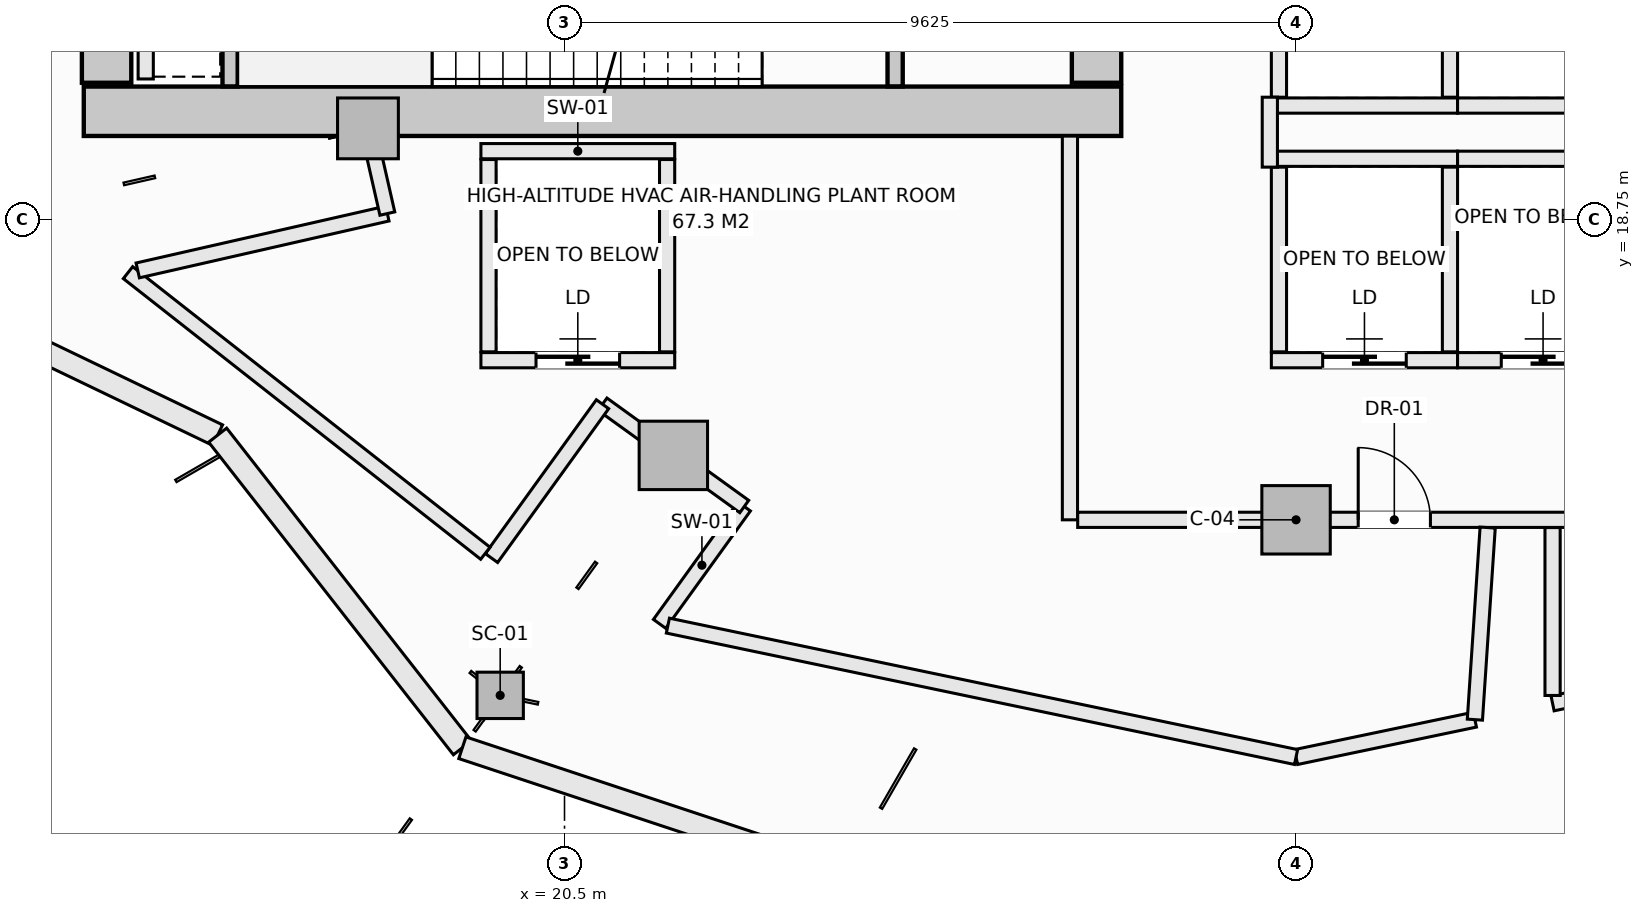
"""IFC4 building model, lengths in metres.
Left out: names, types, materials, properties, quantities, classifications, styles, units other than length and angle.
Written with IfcOpenShell. Run it as: python <this file> out.ifc"""

import sys

from ifc_helpers import new_model, si_unit, direction, frame, frame_2d, origin, origin_2d, place, context, subcontext, project, spatial, rectangle, hollow_rectangle, extrude, element, fill, save


model = new_model("IFC4")
c1 = context("Model", 3, precision=1e-05, world=origin(), true_north=direction((0.0, 1.0)))
c2 = subcontext(c1, "Body", "Model", "MODEL_VIEW")
j1 = project(units=[si_unit("LENGTHUNIT", "METRE"), si_unit("PLANEANGLEUNIT", "RADIAN")], contexts=[c1])
p1 = place(None, origin())
s1 = spatial("IfcSite", under=j1, at=p1, CompositionType="ELEMENT")
p2 = place(p1, origin())
s2 = spatial("IfcBuilding", under=s1, at=p2, CompositionType="ELEMENT")
p3 = place(p2, frame((0.0, 0.0, 186.9)))
s3 = spatial("IfcBuildingStorey", under=s2, at=p3, CompositionType="ELEMENT", Elevation=186.9)
p4 = place(p3, frame((14.175, 20.175, -0.32), z_axis=(0.0, 0.0, 1.0), x_axis=(1.0, 0.0, 0.0)))
e1 = element("IfcWall", 1, at=p4, inside=s3, PredefinedType="SHEAR", context=c2, shape_type="SweptSolid", body=[
    extrude(rectangle(XDim=13.65, YDim=0.65, at=frame_2d((6.825, 0.0))), origin(), (0.0, 0.0, 1.0), 5.04),
])
p5 = place(p3, frame((14.475, 20.55, -0.32), z_axis=(0.0, 0.0, 1.0), x_axis=(0.0, 1.0, 0.0)))
e2 = element("IfcWall", 2, at=p5, inside=s3, PredefinedType="SHEAR", context=c2, shape_type="SweptSolid", body=[
    extrude(rectangle(XDim=12.9, YDim=0.65, at=frame_2d((6.45, 0.0))), origin(), (0.0, 0.0, 1.0), 5.04),
])
p6 = place(p3, frame((27.5, 20.55, -0.32), z_axis=(0.0, 0.0, 1.0), x_axis=(0.0, 1.0, 0.0)))
e3 = element("IfcWall", 3, at=p6, inside=s3, PredefinedType="SHEAR", context=c2, shape_type="SweptSolid", body=[
    extrude(rectangle(XDim=1.5, YDim=0.65, at=frame_2d((0.75, 0.0))), origin(), (0.0, 0.0, 1.0), 5.04),
])
p7 = place(p3, frame((19.654, 12.49, -0.32), z_axis=(0.0, 0.0, 1.0), x_axis=(1.0, 0.0, 0.0)))
e4 = element("IfcColumn", 4, at=p7, inside=s3, PredefinedType="COLUMN", context=c2, shape_type="SweptSolid", body=[
    extrude(hollow_rectangle(XDim=0.61, YDim=0.61, WallThickness=0.025, at=origin_2d()), origin(), (0.0, 0.0, 1.0), 5.04),
])
for number, where, z_axis, x_axis in (
    (5, (21.932, 15.648, -0.32), (0.0, 0.0, 1.0), (1.0, 0.0, 0.0)),
    (6, (30.125, 14.8, -0.32), (0.0, 0.0, 1.0), (1.0, 0.0, 0.0)),
):
    element("IfcColumn", number, at=place(p3, frame(where, z_axis=z_axis, x_axis=x_axis)), inside=s3, PredefinedType="COLUMN", context=c2, shape_type="SweptSolid", body=[
        extrude(rectangle(XDim=0.9, YDim=0.9, at=origin_2d()), origin(), (0.0, 0.0, 1.0), 5.04),
    ])
p8 = place(p3, frame((17.914, 19.95, -0.32), z_axis=(0.0, 0.0, 1.0), x_axis=(1.0, 0.0, 0.0)))
e7 = element("IfcColumn", 7, at=p8, inside=s3, PredefinedType="PILASTER", context=c2, shape_type="SweptSolid", body=[
    extrude(rectangle(XDim=0.8, YDim=0.8, at=origin_2d()), origin(), (0.0, 0.0, 1.0), 5.04),
])
p9 = place(p3, frame((11.127, 18.225, 0.0), z_axis=(0.0, 0.0, 1.0), x_axis=(0.901353070301, -0.433085029363, 0.0)))
e8 = element("IfcWall", 8, at=p9, inside=s3, PredefinedType="SOLIDWALL", context=c2, shape_type="SweptSolid", body=[
    extrude(rectangle(XDim=5.336, YDim=0.3, at=frame_2d((2.668, 0.0))), origin(), (0.0, 0.0, 1.0), 1.15),
])
p10 = place(p3, frame((15.937, 15.914, 0.0), z_axis=(0.0, 0.0, 1.0), x_axis=(0.616429245738, -0.787410302828, 0.0)))
e9 = element("IfcWall", 9, at=p10, inside=s3, PredefinedType="SOLIDWALL", context=c2, shape_type="SweptSolid", body=[
    extrude(rectangle(XDim=5.223, YDim=0.3, at=frame_2d((2.612, 0.0))), origin(), (0.0, 0.0, 1.0), 1.15),
])
p11 = place(p3, frame((19.156, 11.801, 0.0), z_axis=(0.0, 0.0, 1.0), x_axis=(0.949246811547, -0.314532177636, 0.0)))
e10 = element("IfcWall", 10, at=p11, inside=s3, PredefinedType="SOLIDWALL", context=c2, shape_type="SweptSolid", body=[
    extrude(rectangle(XDim=5.574, YDim=0.3, at=frame_2d((2.787, 0.0))), origin(), (0.0, 0.0, 1.0), 1.15),
])
p12 = place(p3, frame((24.85, 20.502, -0.32), z_axis=(0.0, 0.0, 1.0), x_axis=(0.0, 1.0, 0.0)))
e11 = element("IfcWall", 11, at=p12, inside=s3, PredefinedType="SHEAR", context=c2, shape_type="SweptSolid", body=[
    extrude(rectangle(XDim=3.038, YDim=0.2, at=frame_2d((1.519, 0.0))), origin(), (0.0, 0.0, 1.0), 5.04),
])
p13 = place(p12, frame((0.969, 0.0, 0.32)))
e12 = element("IfcOpeningElement", 12, at=p13, cuts=e11, PredefinedType="OPENING", context=c2, shape_type="SweptSolid", body=[
    extrude(rectangle(XDim=1.1, YDim=2.15, at=frame_2d((0.55, 1.075))), frame((0.0, 0.11, 0.0), z_axis=(0.0, -1.0, 0.0), x_axis=(1.0, 0.0, 0.0)), (0.0, 0.0, 1.0), 0.22),
])
p14 = place(p3, frame((16.1, 20.502, -0.32), z_axis=(0.0, 0.0, 1.0), x_axis=(0.0, 1.0, 0.0)))
e13 = element("IfcWall", 13, at=p14, inside=s3, PredefinedType="SHEAR", context=c2, shape_type="SweptSolid", body=[
    extrude(rectangle(XDim=3.036, YDim=0.2, at=frame_2d((1.518, 0.0))), origin(), (0.0, 0.0, 1.0), 5.04),
])
p15 = place(p3, frame((19.4, 19.65, 0.0), z_axis=(0.0, 0.0, 1.0), x_axis=(1.0, 0.0, 0.0)))
e14 = element("IfcWall", 14, at=p15, inside=s3, PredefinedType="SOLIDWALL", context=c2, shape_type="SweptSolid", body=[
    extrude(rectangle(XDim=2.55, YDim=0.2, at=frame_2d((1.275, 0.0))), origin(), (0.0, 0.0, 1.0), 4.72),
])
p16 = place(p3, frame((19.4, 16.9, 0.0), z_axis=(0.0, 0.0, 1.0), x_axis=(1.0, 0.0, 0.0)))
e15 = element("IfcWall", 15, at=p16, inside=s3, PredefinedType="SOLIDWALL", context=c2, shape_type="SweptSolid", body=[
    extrude(rectangle(XDim=2.55, YDim=0.2, at=frame_2d((1.275, 0.0))), origin(), (0.0, 0.0, 1.0), 4.72),
])
p17 = place(p16, frame((0.725, 0.0, 0.0)))
e16 = element("IfcOpeningElement", 16, at=p17, cuts=e15, PredefinedType="OPENING", context=c2, shape_type="SweptSolid", body=[
    extrude(rectangle(XDim=1.1, YDim=2.2, at=frame_2d((0.55, 1.1))), frame((0.0, 0.11, 0.0), z_axis=(0.0, -1.0, 0.0), x_axis=(1.0, 0.0, 0.0)), (0.0, 0.0, 1.0), 0.22),
])
for number, where, z_axis, x_axis in (
    (17, (19.5, 17.01, 0.0), (0.0, 0.0, 1.0), (0.0, 1.0, 0.0)),
    (18, (21.85, 17.01, 0.0), (0.0, 0.0, 1.0), (0.0, 1.0, 0.0)),
):
    element("IfcWall", number, at=place(p3, frame(where, z_axis=z_axis, x_axis=x_axis)), inside=s3, PredefinedType="SOLIDWALL", context=c2, shape_type="SweptSolid", body=[
        extrude(rectangle(XDim=2.53, YDim=0.2, at=frame_2d((1.265, 0.0))), origin(), (0.0, 0.0, 1.0), 4.72),
    ])
p18 = place(p3, frame((29.8, 19.55, 0.0), z_axis=(0.0, 0.0, 1.0), x_axis=(1.0, 0.0, 0.0)))
e19 = element("IfcWall", 19, at=p18, inside=s3, PredefinedType="SOLIDWALL", context=c2, shape_type="SweptSolid", body=[
    extrude(rectangle(XDim=2.45, YDim=0.2, at=frame_2d((1.225, 0.0))), origin(), (0.0, 0.0, 1.0), 4.72),
])
p19 = place(p3, frame((29.8, 16.9, 0.0), z_axis=(0.0, 0.0, 1.0), x_axis=(1.0, 0.0, 0.0)))
e20 = element("IfcWall", 20, at=p19, inside=s3, PredefinedType="SOLIDWALL", context=c2, shape_type="SweptSolid", body=[
    extrude(rectangle(XDim=2.45, YDim=0.2, at=frame_2d((1.225, 0.0))), origin(), (0.0, 0.0, 1.0), 4.72),
])
p20 = place(p19, frame((0.675, 0.0, 0.0)))
e21 = element("IfcOpeningElement", 21, at=p20, cuts=e20, PredefinedType="OPENING", context=c2, shape_type="SweptSolid", body=[
    extrude(rectangle(XDim=1.1, YDim=2.2, at=frame_2d((0.55, 1.1))), frame((0.0, 0.11, 0.0), z_axis=(0.0, -1.0, 0.0), x_axis=(1.0, 0.0, 0.0)), (0.0, 0.0, 1.0), 0.22),
])
for number, where, z_axis, x_axis in (
    (22, (29.9, 17.01, 0.0), (0.0, 0.0, 1.0), (0.0, 1.0, 0.0)),
    (23, (32.15, 17.01, 0.0), (0.0, 0.0, 1.0), (0.0, 1.0, 0.0)),
):
    element("IfcWall", number, at=place(p3, frame(where, z_axis=z_axis, x_axis=x_axis)), inside=s3, PredefinedType="SOLIDWALL", context=c2, shape_type="SweptSolid", body=[
        extrude(rectangle(XDim=2.43, YDim=0.2, at=frame_2d((1.215, 0.0))), origin(), (0.0, 0.0, 1.0), 4.72),
    ])
p21 = place(p3, frame((32.25, 19.55, 0.0), z_axis=(0.0, 0.0, 1.0), x_axis=(1.0, 0.0, 0.0)))
e24 = element("IfcWall", 24, at=p21, inside=s3, PredefinedType="SOLIDWALL", context=c2, shape_type="SweptSolid", body=[
    extrude(rectangle(XDim=2.25, YDim=0.2, at=frame_2d((1.125, 0.0))), origin(), (0.0, 0.0, 1.0), 4.72),
])
p22 = place(p3, frame((32.25, 16.9, 0.0), z_axis=(0.0, 0.0, 1.0), x_axis=(1.0, 0.0, 0.0)))
e25 = element("IfcWall", 25, at=p22, inside=s3, PredefinedType="SOLIDWALL", context=c2, shape_type="SweptSolid", body=[
    extrude(rectangle(XDim=2.25, YDim=0.2, at=frame_2d((1.125, 0.0))), origin(), (0.0, 0.0, 1.0), 4.72),
])
p23 = place(p22, frame((0.575, 0.0, 0.0)))
e26 = element("IfcOpeningElement", 26, at=p23, cuts=e25, PredefinedType="OPENING", context=c2, shape_type="SweptSolid", body=[
    extrude(rectangle(XDim=1.1, YDim=2.2, at=frame_2d((0.55, 1.1))), frame((0.0, 0.11, 0.0), z_axis=(0.0, -1.0, 0.0), x_axis=(1.0, 0.0, 0.0)), (0.0, 0.0, 1.0), 0.22),
])
p24 = place(p3, frame((29.8, 20.25, 0.0), z_axis=(0.0, 0.0, 1.0), x_axis=(1.0, 0.0, 0.0)))
e27 = element("IfcWall", 27, at=p24, inside=s3, PredefinedType="SOLIDWALL", context=c2, shape_type="SweptSolid", body=[
    extrude(rectangle(XDim=2.45, YDim=0.2, at=frame_2d((1.225, 0.0))), origin(), (0.0, 0.0, 1.0), 4.72),
])
for number, where, z_axis, x_axis in (
    (28, (29.9, 20.36, 0.0), (0.0, 0.0, 1.0), (0.0, 1.0, 0.0)),
    (29, (32.15, 20.36, 0.0), (0.0, 0.0, 1.0), (0.0, 1.0, 0.0)),
):
    element("IfcWall", number, at=place(p3, frame(where, z_axis=z_axis, x_axis=x_axis)), inside=s3, PredefinedType="SOLIDWALL", context=c2, shape_type="SweptSolid", body=[
        extrude(rectangle(XDim=2.43, YDim=0.2, at=frame_2d((1.215, 0.0))), origin(), (0.0, 0.0, 1.0), 4.72),
    ])
p25 = place(p3, frame((32.25, 20.25, 0.0), z_axis=(0.0, 0.0, 1.0), x_axis=(1.0, 0.0, 0.0)))
e30 = element("IfcWall", 30, at=p25, inside=s3, PredefinedType="SOLIDWALL", context=c2, shape_type="SweptSolid", body=[
    extrude(rectangle(XDim=2.25, YDim=0.2, at=frame_2d((1.125, 0.0))), origin(), (0.0, 0.0, 1.0), 4.72),
])
p26 = place(p3, frame((14.99, 20.6, 0.0), z_axis=(0.0, 0.0, 1.0), x_axis=(0.0, 1.0, 0.0)))
e31 = element("IfcWall", 31, at=p26, inside=s3, PredefinedType="SOLIDWALL", context=c2, shape_type="SweptSolid", body=[
    extrude(rectangle(XDim=2.85, YDim=0.2, at=frame_2d((1.425, 0.0))), origin(), (0.0, 0.0, 1.0), 4.72),
])
p27 = place(p3, frame((27.15, 14.8, 0.0), z_axis=(0.0, 0.0, 1.0), x_axis=(0.0, 1.0, 0.0)))
e32 = element("IfcWall", 32, at=p27, inside=s3, PredefinedType="SOLIDWALL", context=c2, shape_type="SweptSolid", body=[
    extrude(rectangle(XDim=5.048, YDim=0.2, at=frame_2d((2.524, 0.0))), origin(), (0.0, 0.0, 1.0), 4.72),
])
p28 = place(p3, frame((29.78, 19.44, 0.0), z_axis=(0.0, 0.0, 1.0), x_axis=(0.0, 1.0, 0.0)))
e33 = element("IfcWall", 33, at=p28, inside=s3, PredefinedType="SOLIDWALL", context=c2, shape_type="SweptSolid", body=[
    extrude(rectangle(XDim=0.92, YDim=0.2, at=frame_2d((0.46, 0.0))), origin(), (0.0, 0.0, 1.0), 4.72),
])
p29 = place(p3, frame((27.252, 14.8, 0.0), z_axis=(0.0, 0.0, 1.0), x_axis=(1.0, 0.0, 0.0)))
e34 = element("IfcWall", 34, at=p29, inside=s3, PredefinedType="SOLIDWALL", context=c2, shape_type="SweptSolid", body=[
    extrude(rectangle(XDim=11.666, YDim=0.2, at=frame_2d((5.833, 0.0))), origin(), (0.0, 0.0, 1.0), 4.095),
])
p30 = place(p29, frame((3.691, 0.0, 0.0)))
e35 = element("IfcOpeningElement", 35, at=p30, cuts=e34, PredefinedType="OPENING", context=c2, shape_type="SweptSolid", body=[
    extrude(rectangle(XDim=0.95, YDim=2.1, at=frame_2d((0.475, 1.05))), frame((0.0, 0.11, 0.0), z_axis=(0.0, -1.0, 0.0), x_axis=(1.0, 0.0, 0.0)), (0.0, 0.0, 1.0), 0.22),
])
p31 = place(p3, frame((30.125, 11.679, 0.0), z_axis=(0.0, 0.0, 1.0), x_axis=(0.978816191304, 0.204740967179, 0.0)))
e36 = element("IfcWall", 36, at=p31, inside=s3, PredefinedType="SOLIDWALL", context=c2, shape_type="SweptSolid", body=[
    extrude(rectangle(XDim=2.404, YDim=0.2, at=frame_2d((1.202, 0.0))), origin(), (0.0, 0.0, 1.0), 4.72),
])
p32 = place(p3, frame((33.5, 12.385, 0.0), z_axis=(0.0, 0.0, 1.0), x_axis=(0.978811842639, 0.204761755974, 0.0)))
e37 = element("IfcWall", 37, at=p32, inside=s3, PredefinedType="SOLIDWALL", context=c2, shape_type="SweptSolid", body=[
    extrude(rectangle(XDim=6.652, YDim=0.2, at=frame_2d((3.326, 0.0))), origin(), (0.0, 0.0, 1.0), 4.72),
])
p33 = place(p3, frame((33.5, 12.489, 0.0), z_axis=(0.0, 0.0, 1.0), x_axis=(0.0, 1.0, 0.0)))
e38 = element("IfcWall", 38, at=p33, inside=s3, PredefinedType="SOLIDWALL", context=c2, shape_type="SweptSolid", body=[
    extrude(rectangle(XDim=2.209, YDim=0.2, at=frame_2d((1.104, 0.0))), origin(), (0.0, 0.0, 1.0), 4.72),
])
p34 = place(p3, frame((21.751, 13.431, 0.0), z_axis=(0.0, 0.0, 1.0), x_axis=(0.585064462576, 0.810986790663, 0.0)))
e39 = element("IfcWall", 39, at=p34, inside=s3, PredefinedType="SOLIDWALL", context=c2, shape_type="SweptSolid", body=[
    extrude(rectangle(XDim=1.904, YDim=0.2, at=frame_2d((0.952, 0.0))), origin(), (0.0, 0.0, 1.0), 4.72),
])
p35 = place(p3, frame((21.0, 16.321, 0.0), z_axis=(0.0, 0.0, 1.0), x_axis=(0.81088351332, -0.585207593786, 0.0)))
e40 = element("IfcWall", 40, at=p35, inside=s3, PredefinedType="SOLIDWALL", context=c2, shape_type="SweptSolid", body=[
    extrude(rectangle(XDim=2.3, YDim=0.2, at=frame_2d((1.15, 0.0))), origin(), (0.0, 0.0, 1.0), 4.095),
])
p36 = place(p3, frame((19.539, 14.297, 0.0), z_axis=(0.0, 0.0, 1.0), x_axis=(0.585283411791, 0.810828790733, 0.0)))
e41 = element("IfcWall", 41, at=p36, inside=s3, PredefinedType="SOLIDWALL", context=c2, shape_type="SweptSolid", body=[
    extrude(rectangle(XDim=2.496, YDim=0.2, at=frame_2d((1.248, 0.0))), origin(), (0.0, 0.0, 1.0), 4.72),
])
p37 = place(p3, frame((14.757, 18.052, 0.0), z_axis=(0.0, 0.0, 1.0), x_axis=(0.786502536139, -0.617587047019, 0.0)))
e42 = element("IfcWall", 42, at=p37, inside=s3, PredefinedType="SOLIDWALL", context=c2, shape_type="SweptSolid", body=[
    extrude(rectangle(XDim=5.978, YDim=0.2, at=frame_2d((2.989, 0.0))), origin(), (0.0, 0.0, 1.0), 4.72),
])
p38 = place(p3, frame((14.885, 18.081, 0.0), z_axis=(0.0, 0.0, 1.0), x_axis=(0.975039488854, 0.222031518427, 0.0)))
e43 = element("IfcWall", 43, at=p38, inside=s3, PredefinedType="SOLIDWALL", context=c2, shape_type="SweptSolid", body=[
    extrude(rectangle(XDim=3.368, YDim=0.2, at=frame_2d((1.684, 0.0))), origin(), (0.0, 0.0, 1.0), 4.72),
])
p39 = place(p3, frame((17.937, 19.848, 0.0), z_axis=(0.0, 0.0, 1.0), x_axis=(0.221752397237, -0.97510300703, 0.0)))
e44 = element("IfcWall", 44, at=p39, inside=s3, PredefinedType="SOLIDWALL", context=c2, shape_type="SweptSolid", body=[
    extrude(rectangle(XDim=1.045, YDim=0.2, at=frame_2d((0.522, 0.0))), origin(), (0.0, 0.0, 1.0), 4.095),
])
p40 = place(p3, frame((32.478, 12.171, 0.0), z_axis=(0.0, 0.0, 1.0), x_axis=(0.066423031806, 0.997791551801, 0.0)))
e45 = element("IfcWall", 45, at=p40, inside=s3, PredefinedType="SOLIDWALL", context=c2, shape_type="SweptSolid", body=[
    extrude(rectangle(XDim=2.532, YDim=0.2, at=frame_2d((1.266, 0.0))), origin(), (0.0, 0.0, 1.0), 4.72),
])
p41 = place(p3, frame((21.86, 13.408, 0.0), z_axis=(0.0, 0.0, 1.0), x_axis=(0.978803971654, -0.204799377621, 0.0)))
e46 = element("IfcWall", 46, at=p41, inside=s3, PredefinedType="SOLIDWALL", context=c2, shape_type="SweptSolid", body=[
    extrude(rectangle(XDim=8.444, YDim=0.2, at=frame_2d((4.222, 0.0))), origin(), (0.0, 0.0, 1.0), 4.72),
])
p42 = place(p17, origin())
e47 = element("IfcDoor", 47, at=p42, inside=s3, OperationType="SLIDING_TO_LEFT", PredefinedType="DOOR", context=c2, shape_type="SweptSolid", body=[
    extrude(rectangle(XDim=1.1, YDim=2.2, at=frame_2d((0.55, 1.1))), frame((0.0, 0.025, 0.0), z_axis=(0.0, -1.0, 0.0), x_axis=(1.0, 0.0, 0.0)), (0.0, 0.0, 1.0), 0.05),
])
fill(e16, e47)
p43 = place(p20, origin())
e48 = element("IfcDoor", 48, at=p43, inside=s3, OperationType="SLIDING_TO_LEFT", PredefinedType="DOOR", context=c2, shape_type="SweptSolid", body=[
    extrude(rectangle(XDim=1.1, YDim=2.2, at=frame_2d((0.55, 1.1))), frame((0.0, 0.025, 0.0), z_axis=(0.0, -1.0, 0.0), x_axis=(1.0, 0.0, 0.0)), (0.0, 0.0, 1.0), 0.05),
])
fill(e21, e48)
p44 = place(p23, origin())
e49 = element("IfcDoor", 49, at=p44, inside=s3, OperationType="SLIDING_TO_LEFT", PredefinedType="DOOR", context=c2, shape_type="SweptSolid", body=[
    extrude(rectangle(XDim=1.1, YDim=2.2, at=frame_2d((0.55, 1.1))), frame((0.0, 0.025, 0.0), z_axis=(0.0, -1.0, 0.0), x_axis=(1.0, 0.0, 0.0)), (0.0, 0.0, 1.0), 0.05),
])
fill(e26, e49)
p45 = place(p30, origin())
e50 = element("IfcDoor", 50, at=p45, inside=s3, OperationType="SINGLE_SWING_LEFT", PredefinedType="DOOR", context=c2, shape_type="SweptSolid", body=[
    extrude(rectangle(XDim=0.95, YDim=2.1, at=frame_2d((0.475, 1.05))), frame((0.0, 0.025, 0.0), z_axis=(0.0, -1.0, 0.0), x_axis=(1.0, 0.0, 0.0)), (0.0, 0.0, 1.0), 0.05),
])
fill(e35, e50)
save(model, sys.argv[1])
